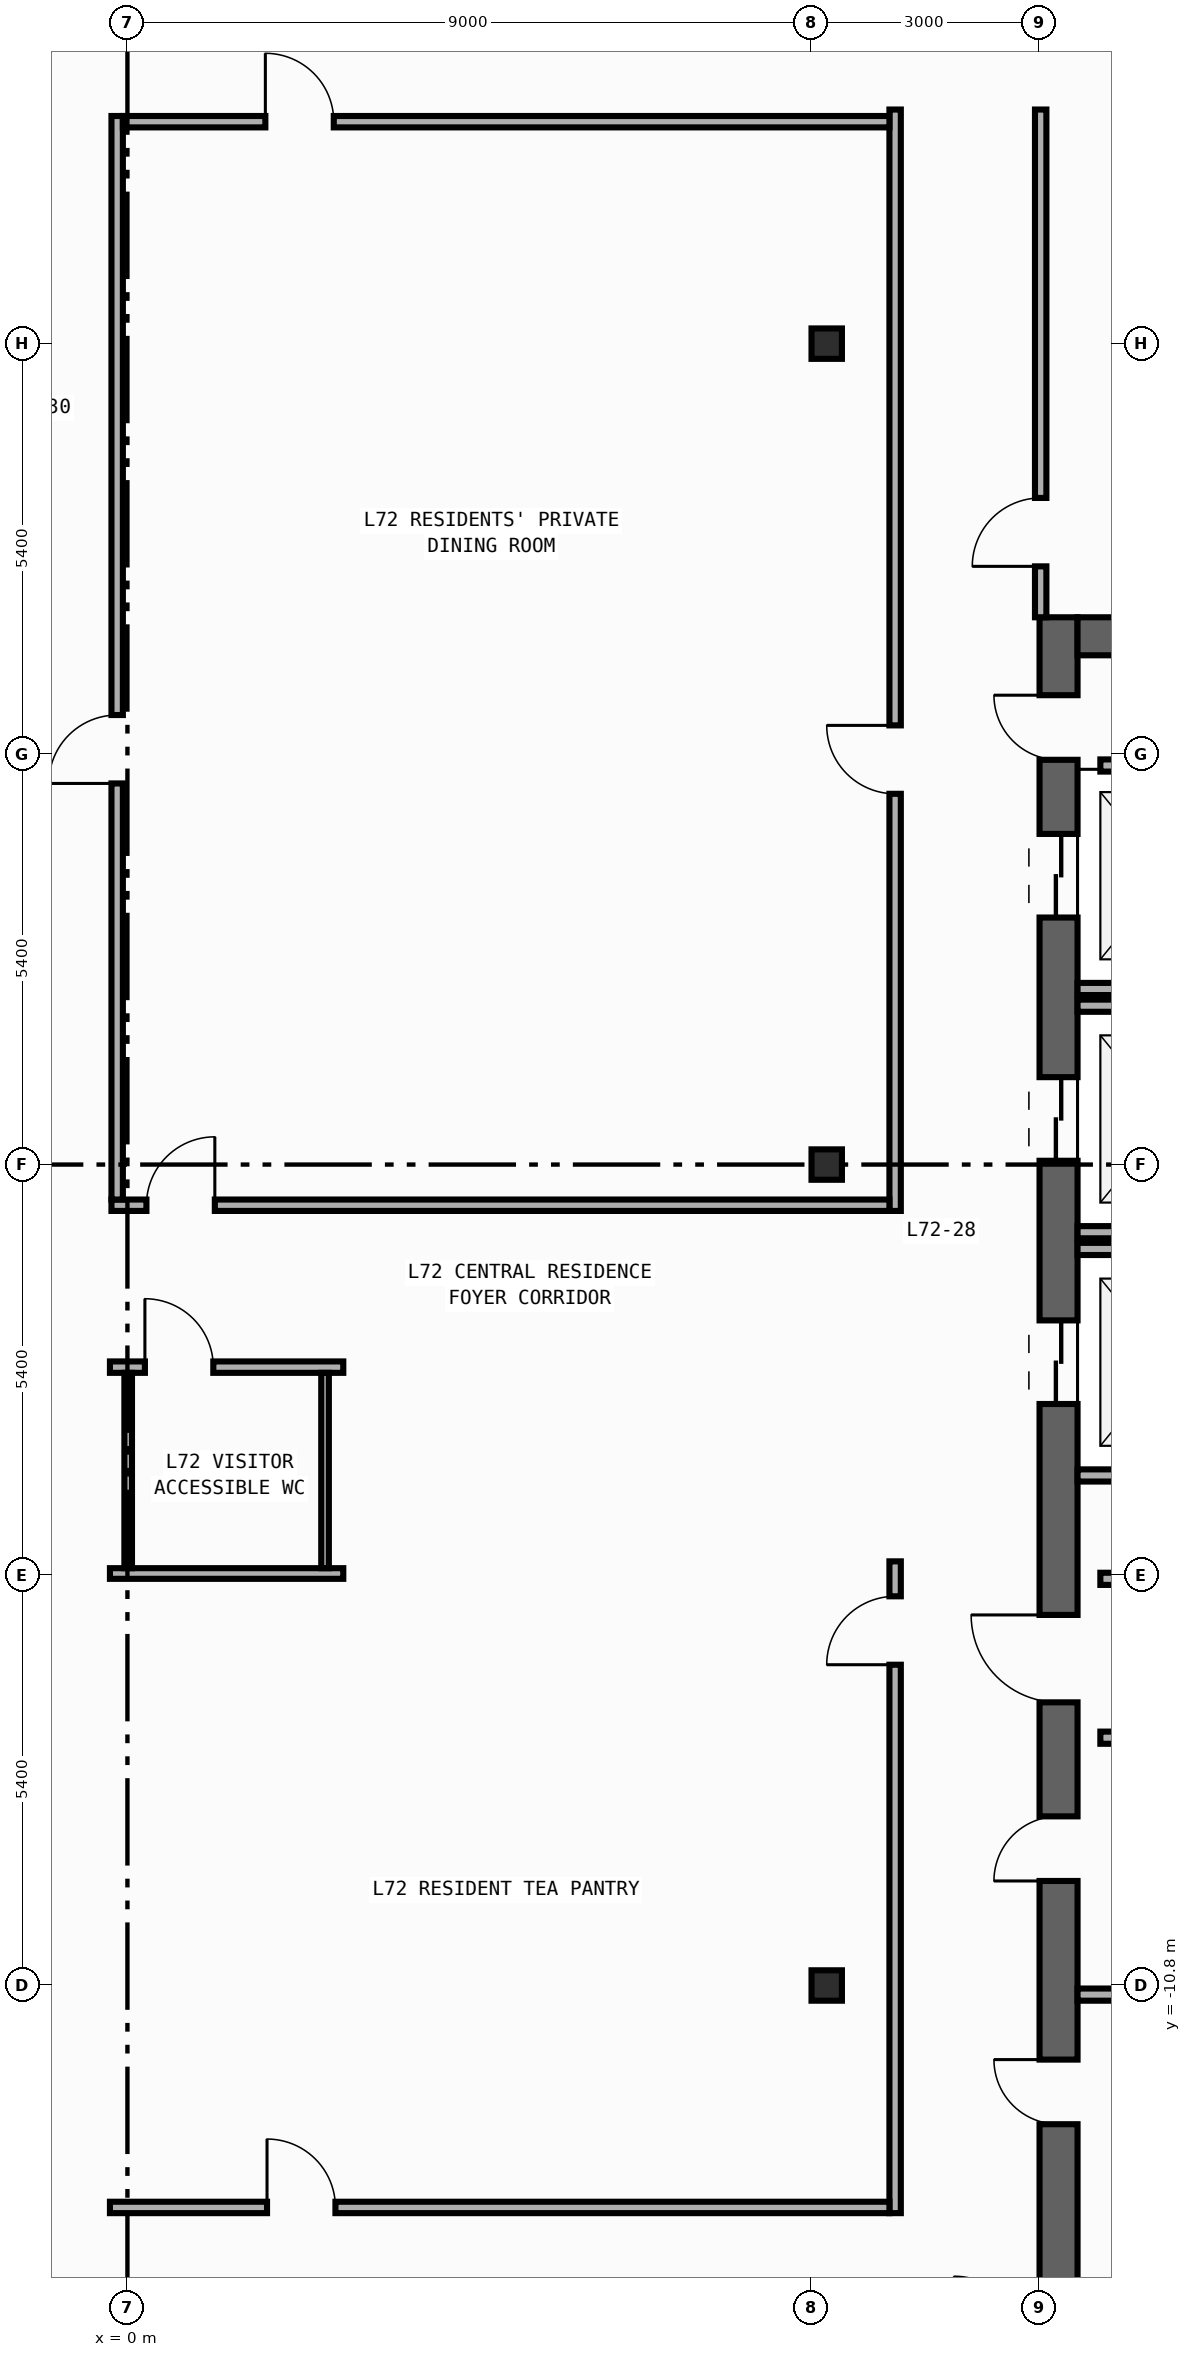
"""IFC4 building model, lengths in metres.
Left out: names, types, materials, properties, quantities, classifications, styles, units other than length and angle.
Written with IfcOpenShell. Run it as: python <this file> out.ifc"""

import sys

from ifc_helpers import new_model, si_unit, direction, frame, frame_2d, origin, origin_2d, place, context, subcontext, project, spatial, rectangle, i_section, extrude, element, fill, save


model = new_model("IFC4")
c1 = context("Model", 3, precision=1e-05, world=origin(), true_north=direction((0.0, 1.0)))
c2 = subcontext(c1, "Body", "Model", "MODEL_VIEW")
j1 = project(units=[si_unit("LENGTHUNIT", "METRE"), si_unit("PLANEANGLEUNIT", "RADIAN")], contexts=[c1])
p1 = place(None, origin())
s1 = spatial("IfcSite", under=j1, at=p1, CompositionType="ELEMENT")
p2 = place(p1, origin())
s2 = spatial("IfcBuilding", under=s1, at=p2, CompositionType="ELEMENT")
p3 = place(p2, frame((0.0, 0.0, 300.4)))
s3 = spatial("IfcBuildingStorey", under=s2, at=p3, CompositionType="ELEMENT", Elevation=300.4)
p4 = place(p3, frame((12.25, -19.8, 0.0), z_axis=(0.0, 0.0, 1.0), x_axis=(0.0, 1.0, 0.0)))
e1 = element("IfcWall", 1, at=p4, inside=s3, PredefinedType="SHEAR", context=c2, shape_type="SweptSolid", body=[
    extrude(rectangle(XDim=27.0, YDim=0.5, at=frame_2d((13.5, 0.0))), origin(), (0.0, 0.0, 1.0), 3.54),
])
p5 = place(p4, frame((23.05, 0.0, 0.0)))
e2 = element("IfcOpeningElement", 2, at=p5, cuts=e1, PredefinedType="OPENING", context=c2, shape_type="SweptSolid", body=[
    extrude(rectangle(XDim=1.1, YDim=2.2, at=frame_2d((0.55, 1.1))), frame((0.0, 0.26, 0.0), z_axis=(0.0, -1.0, 0.0), x_axis=(1.0, 0.0, 0.0)), (0.0, 0.0, 1.0), 0.52),
])
p6 = place(p4, frame((19.85, 0.0, 0.0)))
e3 = element("IfcOpeningElement", 3, at=p6, cuts=e1, PredefinedType="OPENING", context=c2, shape_type="SweptSolid", body=[
    extrude(rectangle(XDim=1.1, YDim=2.2, at=frame_2d((0.55, 1.1))), frame((0.0, 0.26, 0.0), z_axis=(0.0, -1.0, 0.0), x_axis=(1.0, 0.0, 0.0)), (0.0, 0.0, 1.0), 0.52),
])
p7 = place(p4, frame((16.65, 0.0, 0.0)))
e4 = element("IfcOpeningElement", 4, at=p7, cuts=e1, PredefinedType="OPENING", context=c2, shape_type="SweptSolid", body=[
    extrude(rectangle(XDim=1.1, YDim=2.2, at=frame_2d((0.55, 1.1))), frame((0.0, 0.26, 0.0), z_axis=(0.0, -1.0, 0.0), x_axis=(1.0, 0.0, 0.0)), (0.0, 0.0, 1.0), 0.52),
])
p8 = place(p4, frame((7.175, 0.0, 0.0)))
e5 = element("IfcOpeningElement", 5, at=p8, cuts=e1, PredefinedType="OPENING", context=c2, shape_type="SweptSolid", body=[
    extrude(rectangle(XDim=0.85, YDim=2.1, at=frame_2d((0.425, 1.05))), frame((0.0, 0.26, 0.0), z_axis=(0.0, -1.0, 0.0), x_axis=(1.0, 0.0, 0.0)), (0.0, 0.0, 1.0), 0.52),
])
p9 = place(p4, frame((10.375, 0.0, 0.0)))
e6 = element("IfcOpeningElement", 6, at=p9, cuts=e1, PredefinedType="OPENING", context=c2, shape_type="SweptSolid", body=[
    extrude(rectangle(XDim=0.85, YDim=2.1, at=frame_2d((0.425, 1.05))), frame((0.0, 0.26, 0.0), z_axis=(0.0, -1.0, 0.0), x_axis=(1.0, 0.0, 0.0)), (0.0, 0.0, 1.0), 0.52),
])
p10 = place(p4, frame((12.725, 0.0, 0.0)))
e7 = element("IfcOpeningElement", 7, at=p10, cuts=e1, PredefinedType="OPENING", context=c2, shape_type="SweptSolid", body=[
    extrude(rectangle(XDim=1.15, YDim=2.2, at=frame_2d((0.575, 1.1))), frame((0.0, 0.26, 0.0), z_axis=(0.0, -1.0, 0.0), x_axis=(1.0, 0.0, 0.0)), (0.0, 0.0, 1.0), 0.52),
])
p11 = place(p4, frame((25.125, 0.0, 0.0)))
e8 = element("IfcOpeningElement", 8, at=p11, cuts=e1, PredefinedType="OPENING", context=c2, shape_type="SweptSolid", body=[
    extrude(rectangle(XDim=0.85, YDim=2.1, at=frame_2d((0.425, 1.05))), frame((0.0, 0.26, 0.0), z_axis=(0.0, -1.0, 0.0), x_axis=(1.0, 0.0, 0.0)), (0.0, 0.0, 1.0), 0.52),
])
p12 = place(p3, frame((12.5, 6.95, 0.0), z_axis=(0.0, 0.0, 1.0), x_axis=(1.0, 0.0, 0.0)))
e9 = element("IfcWall", 9, at=p12, inside=s3, PredefinedType="SHEAR", context=c2, shape_type="SweptSolid", body=[
    extrude(rectangle(XDim=7.4, YDim=0.5, at=frame_2d((3.7, 0.0))), origin(), (0.0, 0.0, 1.0), 3.54),
])
for number, where, z_axis, x_axis in (
    (10, (9.2, -10.8, 0.0), (0.0, 0.0, 1.0), (1.0, 0.0, 0.0)),
    (11, (9.2, 0.0, 0.0), (0.0, 0.0, 1.0), (1.0, 0.0, 0.0)),
    (12, (9.2, 10.8, 0.0), (0.0, 0.0, 1.0), (1.0, 0.0, 0.0)),
):
    element("IfcColumn", number, at=place(p3, frame(where, z_axis=z_axis, x_axis=x_axis)), inside=s3, PredefinedType="COLUMN", context=c2, shape_type="SweptSolid", body=[
        extrude(i_section(OverallWidth=0.4, OverallDepth=0.4, WebThickness=0.013, FlangeThickness=0.021, FilletRadius=0.022, at=origin_2d()), origin(), (0.0, 0.0, 1.0), 3.8),
    ])
for number, where, z_axis, x_axis in (
    (13, (12.5, 2.31, 0.0), (0.0, 0.0, 1.0), (1.0, 0.0, 0.0)),
    (14, (12.5, -0.89, 0.0), (0.0, 0.0, 1.0), (1.0, 0.0, 0.0)),
    (15, (12.5, 2.09, 0.0), (0.0, 0.0, 1.0), (1.0, 0.0, 0.0)),
    (16, (12.5, -4.09, 0.0), (0.0, 0.0, 1.0), (1.0, 0.0, 0.0)),
    (17, (12.5, -1.11, 0.0), (0.0, 0.0, 1.0), (1.0, 0.0, 0.0)),
):
    element("IfcWall", number, at=place(p3, frame(where, z_axis=z_axis, x_axis=x_axis)), inside=s3, PredefinedType="STANDARD", context=c2, shape_type="SweptSolid", body=[
        extrude(rectangle(XDim=2.49, YDim=0.16, at=frame_2d((1.245, 0.0))), origin(), (0.0, 0.0, 1.0), 3.54),
    ])
for number, where, z_axis, x_axis in (
    (18, (12.8, -5.45, 0.0), (0.0, 0.0, 1.0), (1.0, 0.0, 0.0)),
    (19, (12.8, -7.54, 0.0), (0.0, 0.0, 1.0), (1.0, 0.0, 0.0)),
    (20, (12.8, 5.25, 0.0), (0.0, 0.0, 1.0), (1.0, 0.0, 0.0)),
):
    element("IfcWall", number, at=place(p3, frame(where, z_axis=z_axis, x_axis=x_axis)), inside=s3, PredefinedType="STANDARD", context=c2, shape_type="SweptSolid", body=[
        extrude(rectangle(XDim=2.6, YDim=0.16, at=frame_2d((1.3, 0.0))), origin(), (0.0, 0.0, 1.0), 3.54),
    ])
p13 = place(p3, frame((12.5, -10.92, 0.0), z_axis=(0.0, 0.0, 1.0), x_axis=(1.0, 0.0, 0.0)))
e21 = element("IfcWall", 21, at=p13, inside=s3, PredefinedType="PARTITIONING", context=c2, shape_type="SweptSolid", body=[
    extrude(rectangle(XDim=2.9, YDim=0.16, at=frame_2d((1.45, 0.0))), origin(), (0.0, 0.0, 1.0), 2.64),
])
p14 = place(p3, frame((12.015, 7.2, 0.0), z_axis=(0.0, 0.0, 1.0), x_axis=(0.0, 1.0, 0.0)))
e22 = element("IfcWall", 22, at=p14, inside=s3, PredefinedType="PARTITIONING", context=c2, shape_type="SweptSolid", body=[
    extrude(rectangle(XDim=6.68, YDim=0.15, at=frame_2d((3.34, 0.0))), origin(), (0.0, 0.0, 1.0), 3.54),
])
p15 = place(p14, frame((0.67, 0.0, 0.0)))
e23 = element("IfcOpeningElement", 23, at=p15, cuts=e22, PredefinedType="OPENING", context=c2, shape_type="SweptSolid", body=[
    extrude(rectangle(XDim=0.9, YDim=2.15, at=frame_2d((0.45, 1.075))), frame((0.0, 0.085, 0.0), z_axis=(0.0, -1.0, 0.0), x_axis=(1.0, 0.0, 0.0)), (0.0, 0.0, 1.0), 0.17),
])
p16 = place(p3, frame((10.1, -0.61, 0.0), z_axis=(0.0, 0.0, 1.0), x_axis=(0.0, 1.0, 0.0)))
e24 = element("IfcWall", 24, at=p16, inside=s3, PredefinedType="PARTITIONING", context=c2, shape_type="SweptSolid", body=[
    extrude(rectangle(XDim=14.49, YDim=0.15, at=frame_2d((7.245, 0.0))), origin(), (0.0, 0.0, 1.0), 3.54),
])
p17 = place(p16, frame((5.488, 0.0, 0.0)))
e25 = element("IfcOpeningElement", 25, at=p17, cuts=e24, PredefinedType="OPENING", context=c2, shape_type="SweptSolid", body=[
    extrude(rectangle(XDim=0.9, YDim=2.15, at=frame_2d((0.45, 1.075))), frame((0.0, 0.085, 0.0), z_axis=(0.0, -1.0, 0.0), x_axis=(1.0, 0.0, 0.0)), (0.0, 0.0, 1.0), 0.17),
])
p18 = place(p3, frame((10.1, -13.795, 0.0), z_axis=(0.0, 0.0, 1.0), x_axis=(0.0, 1.0, 0.0)))
e26 = element("IfcWall", 26, at=p18, inside=s3, PredefinedType="PARTITIONING", context=c2, shape_type="SweptSolid", body=[
    extrude(rectangle(XDim=8.575, YDim=0.15, at=frame_2d((4.288, 0.0))), origin(), (0.0, 0.0, 1.0), 3.54),
])
p19 = place(p18, frame((7.215, 0.0, 0.0)))
e27 = element("IfcOpeningElement", 27, at=p19, cuts=e26, PredefinedType="OPENING", context=c2, shape_type="SweptSolid", body=[
    extrude(rectangle(XDim=0.9, YDim=2.15, at=frame_2d((0.45, 1.075))), frame((0.0, 0.085, 0.0), z_axis=(0.0, -1.0, 0.0), x_axis=(1.0, 0.0, 0.0)), (0.0, 0.0, 1.0), 0.17),
])
p20 = place(p3, frame((-0.21, -0.535, 0.0), z_axis=(0.0, 0.0, 1.0), x_axis=(1.0, 0.0, 0.0)))
e28 = element("IfcWall", 28, at=p20, inside=s3, PredefinedType="PARTITIONING", context=c2, shape_type="SweptSolid", body=[
    extrude(rectangle(XDim=10.235, YDim=0.15, at=frame_2d((5.117, 0.0))), origin(), (0.0, 0.0, 1.0), 3.54),
])
p21 = place(p20, frame((0.46, 0.0, 0.0)))
e29 = element("IfcOpeningElement", 29, at=p21, cuts=e28, PredefinedType="OPENING", context=c2, shape_type="SweptSolid", body=[
    extrude(rectangle(XDim=0.9, YDim=2.15, at=frame_2d((0.45, 1.075))), frame((0.0, 0.085, 0.0), z_axis=(0.0, -1.0, 0.0), x_axis=(1.0, 0.0, 0.0)), (0.0, 0.0, 1.0), 0.17),
])
p22 = place(p3, frame((-0.23, -2.665, 0.0), z_axis=(0.0, 0.0, 1.0), x_axis=(1.0, 0.0, 0.0)))
e30 = element("IfcWall", 30, at=p22, inside=s3, PredefinedType="PARTITIONING", context=c2, shape_type="SweptSolid", body=[
    extrude(rectangle(XDim=3.07, YDim=0.15, at=frame_2d((1.535, 0.0))), origin(), (0.0, 0.0, 1.0), 3.54),
])
p23 = place(p22, frame((0.46, 0.0, 0.0)))
e31 = element("IfcOpeningElement", 31, at=p23, cuts=e30, PredefinedType="OPENING", context=c2, shape_type="SweptSolid", body=[
    extrude(rectangle(XDim=0.9, YDim=2.15, at=frame_2d((0.45, 1.075))), frame((0.0, 0.085, 0.0), z_axis=(0.0, -1.0, 0.0), x_axis=(1.0, 0.0, 0.0)), (0.0, 0.0, 1.0), 0.17),
])
p24 = place(p3, frame((-0.135, -0.46, 0.0), z_axis=(0.0, 0.0, 1.0), x_axis=(0.0, 1.0, 0.0)))
e32 = element("IfcWall", 32, at=p24, inside=s3, PredefinedType="PARTITIONING", context=c2, shape_type="SweptSolid", body=[
    extrude(rectangle(XDim=14.255, YDim=0.15, at=frame_2d((7.127, 0.0))), origin(), (0.0, 0.0, 1.0), 3.54),
])
p25 = place(p24, frame((5.474, 0.0, 0.0)))
e33 = element("IfcOpeningElement", 33, at=p25, cuts=e32, PredefinedType="OPENING", context=c2, shape_type="SweptSolid", body=[
    extrude(rectangle(XDim=0.9, YDim=2.15, at=frame_2d((0.45, 1.075))), frame((0.0, 0.085, 0.0), z_axis=(0.0, -1.0, 0.0), x_axis=(1.0, 0.0, 0.0)), (0.0, 0.0, 1.0), 0.17),
])
p26 = place(p3, frame((-0.06, 13.72, 0.0), z_axis=(0.0, 0.0, 1.0), x_axis=(1.0, 0.0, 0.0)))
e34 = element("IfcWall", 34, at=p26, inside=s3, PredefinedType="PARTITIONING", context=c2, shape_type="SweptSolid", body=[
    extrude(rectangle(XDim=10.085, YDim=0.15, at=frame_2d((5.042, 0.0))), origin(), (0.0, 0.0, 1.0), 3.54),
])
p27 = place(p26, frame((1.875, 0.0, 0.0)))
e35 = element("IfcOpeningElement", 35, at=p27, cuts=e34, PredefinedType="OPENING", context=c2, shape_type="SweptSolid", body=[
    extrude(rectangle(XDim=0.9, YDim=2.15, at=frame_2d((0.45, 1.075))), frame((0.0, 0.085, 0.0), z_axis=(0.0, -1.0, 0.0), x_axis=(1.0, 0.0, 0.0)), (0.0, 0.0, 1.0), 0.17),
])
p28 = place(p3, frame((-0.23, -13.72, 0.0), z_axis=(0.0, 0.0, 1.0), x_axis=(1.0, 0.0, 0.0)))
e36 = element("IfcWall", 36, at=p28, inside=s3, PredefinedType="PARTITIONING", context=c2, shape_type="SweptSolid", body=[
    extrude(rectangle(XDim=10.255, YDim=0.15, at=frame_2d((5.127, 0.0))), origin(), (0.0, 0.0, 1.0), 3.54),
])
p29 = place(p28, frame((2.067, 0.0, 0.0)))
e37 = element("IfcOpeningElement", 37, at=p29, cuts=e36, PredefinedType="OPENING", context=c2, shape_type="SweptSolid", body=[
    extrude(rectangle(XDim=0.9, YDim=2.15, at=frame_2d((0.45, 1.075))), frame((0.0, 0.085, 0.0), z_axis=(0.0, -1.0, 0.0), x_axis=(1.0, 0.0, 0.0)), (0.0, 0.0, 1.0), 0.17),
])
p30 = place(p3, frame((-0.23, -5.38, 0.0), z_axis=(0.0, 0.0, 1.0), x_axis=(1.0, 0.0, 0.0)))
e38 = element("IfcWall", 38, at=p30, inside=s3, PredefinedType="PARTITIONING", context=c2, shape_type="SweptSolid", body=[
    extrude(rectangle(XDim=3.07, YDim=0.14, at=frame_2d((1.535, 0.0))), origin(), (0.0, 0.0, 1.0), 3.54),
])
for number, where, z_axis, x_axis in (
    (39, (2.6, -2.74, 0.0), (0.0, 0.0, 1.0), (0.0, -1.0, 0.0)),
    (40, (0.01, -5.31, 0.0), (0.0, 0.0, 1.0), (0.0, 1.0, 0.0)),
):
    element("IfcWall", number, at=place(p3, frame(where, z_axis=z_axis, x_axis=x_axis)), inside=s3, PredefinedType="PARTITIONING", context=c2, shape_type="SweptSolid", body=[
        extrude(rectangle(XDim=2.57, YDim=0.1, at=frame_2d((1.285, 0.0))), origin(), (0.0, 0.0, 1.0), 3.54),
    ])
p31 = place(p5, origin())
e41 = element("IfcDoor", 41, at=p31, inside=s3, OperationType="DOUBLE_DOOR_SLIDING", PredefinedType="DOOR", context=c2, shape_type="SweptSolid", body=[
    extrude(rectangle(XDim=1.1, YDim=2.2, at=frame_2d((0.55, 1.1))), frame((0.0, 0.025, 0.0), z_axis=(0.0, -1.0, 0.0), x_axis=(1.0, 0.0, 0.0)), (0.0, 0.0, 1.0), 0.05),
])
fill(e2, e41)
p32 = place(p6, origin())
e42 = element("IfcDoor", 42, at=p32, inside=s3, OperationType="DOUBLE_DOOR_SLIDING", PredefinedType="DOOR", context=c2, shape_type="SweptSolid", body=[
    extrude(rectangle(XDim=1.1, YDim=2.2, at=frame_2d((0.55, 1.1))), frame((0.0, 0.025, 0.0), z_axis=(0.0, -1.0, 0.0), x_axis=(1.0, 0.0, 0.0)), (0.0, 0.0, 1.0), 0.05),
])
fill(e3, e42)
p33 = place(p7, origin())
e43 = element("IfcDoor", 43, at=p33, inside=s3, OperationType="DOUBLE_DOOR_SLIDING", PredefinedType="DOOR", context=c2, shape_type="SweptSolid", body=[
    extrude(rectangle(XDim=1.1, YDim=2.2, at=frame_2d((0.55, 1.1))), frame((0.0, 0.025, 0.0), z_axis=(0.0, -1.0, 0.0), x_axis=(1.0, 0.0, 0.0)), (0.0, 0.0, 1.0), 0.05),
])
fill(e4, e43)
p34 = place(p8, origin())
e44 = element("IfcDoor", 44, at=p34, inside=s3, OperationType="SINGLE_SWING_RIGHT", PredefinedType="DOOR", context=c2, shape_type="SweptSolid", body=[
    extrude(rectangle(XDim=0.85, YDim=2.1, at=frame_2d((0.425, 1.05))), frame((0.0, 0.025, 0.0), z_axis=(0.0, -1.0, 0.0), x_axis=(1.0, 0.0, 0.0)), (0.0, 0.0, 1.0), 0.05),
])
fill(e5, e44)
p35 = place(p9, origin())
e45 = element("IfcDoor", 45, at=p35, inside=s3, OperationType="SINGLE_SWING_LEFT", PredefinedType="DOOR", context=c2, shape_type="SweptSolid", body=[
    extrude(rectangle(XDim=0.85, YDim=2.1, at=frame_2d((0.425, 1.05))), frame((0.0, 0.025, 0.0), z_axis=(0.0, -1.0, 0.0), x_axis=(1.0, 0.0, 0.0)), (0.0, 0.0, 1.0), 0.05),
])
fill(e6, e45)
p36 = place(p10, origin())
e46 = element("IfcDoor", 46, at=p36, inside=s3, OperationType="SINGLE_SWING_RIGHT", PredefinedType="DOOR", context=c2, shape_type="SweptSolid", body=[
    extrude(rectangle(XDim=1.15, YDim=2.2, at=frame_2d((0.575, 1.1))), frame((0.0, 0.025, 0.0), z_axis=(0.0, -1.0, 0.0), x_axis=(1.0, 0.0, 0.0)), (0.0, 0.0, 1.0), 0.05),
])
fill(e7, e46)
p37 = place(p11, origin())
e47 = element("IfcDoor", 47, at=p37, inside=s3, OperationType="SINGLE_SWING_RIGHT", PredefinedType="DOOR", context=c2, shape_type="SweptSolid", body=[
    extrude(rectangle(XDim=0.85, YDim=2.1, at=frame_2d((0.425, 1.05))), frame((0.0, 0.025, 0.0), z_axis=(0.0, -1.0, 0.0), x_axis=(1.0, 0.0, 0.0)), (0.0, 0.0, 1.0), 0.05),
])
fill(e8, e47)
p38 = place(p15, origin())
e48 = element("IfcDoor", 48, at=p38, inside=s3, OperationType="SINGLE_SWING_LEFT", PredefinedType="DOOR", context=c2, shape_type="SweptSolid", body=[
    extrude(rectangle(XDim=0.9, YDim=2.15, at=frame_2d((0.45, 1.075))), frame((0.0, 0.025, 0.0), z_axis=(0.0, -1.0, 0.0), x_axis=(1.0, 0.0, 0.0)), (0.0, 0.0, 1.0), 0.05),
])
fill(e23, e48)
p39 = place(p17, origin())
e49 = element("IfcDoor", 49, at=p39, inside=s3, OperationType="SINGLE_SWING_RIGHT", PredefinedType="DOOR", context=c2, shape_type="SweptSolid", body=[
    extrude(rectangle(XDim=0.9, YDim=2.15, at=frame_2d((0.45, 1.075))), frame((0.0, 0.025, 0.0), z_axis=(0.0, -1.0, 0.0), x_axis=(1.0, 0.0, 0.0)), (0.0, 0.0, 1.0), 0.05),
])
fill(e25, e49)
p40 = place(p19, origin())
e50 = element("IfcDoor", 50, at=p40, inside=s3, OperationType="SINGLE_SWING_LEFT", PredefinedType="DOOR", context=c2, shape_type="SweptSolid", body=[
    extrude(rectangle(XDim=0.9, YDim=2.15, at=frame_2d((0.45, 1.075))), frame((0.0, 0.025, 0.0), z_axis=(0.0, -1.0, 0.0), x_axis=(1.0, 0.0, 0.0)), (0.0, 0.0, 1.0), 0.05),
])
fill(e27, e50)
p41 = place(p21, origin())
e51 = element("IfcDoor", 51, at=p41, inside=s3, OperationType="SINGLE_SWING_RIGHT", PredefinedType="DOOR", context=c2, shape_type="SweptSolid", body=[
    extrude(rectangle(XDim=0.9, YDim=2.15, at=frame_2d((0.45, 1.075))), frame((0.0, 0.025, 0.0), z_axis=(0.0, -1.0, 0.0), x_axis=(1.0, 0.0, 0.0)), (0.0, 0.0, 1.0), 0.05),
])
fill(e29, e51)
p42 = place(p23, origin())
e52 = element("IfcDoor", 52, at=p42, inside=s3, OperationType="SINGLE_SWING_LEFT", PredefinedType="DOOR", context=c2, shape_type="SweptSolid", body=[
    extrude(rectangle(XDim=0.9, YDim=2.15, at=frame_2d((0.45, 1.075))), frame((0.0, 0.025, 0.0), z_axis=(0.0, -1.0, 0.0), x_axis=(1.0, 0.0, 0.0)), (0.0, 0.0, 1.0), 0.05),
])
fill(e31, e52)
p43 = place(p25, origin())
e53 = element("IfcDoor", 53, at=p43, inside=s3, OperationType="SINGLE_SWING_LEFT", PredefinedType="DOOR", context=c2, shape_type="SweptSolid", body=[
    extrude(rectangle(XDim=0.9, YDim=2.15, at=frame_2d((0.45, 1.075))), frame((0.0, 0.025, 0.0), z_axis=(0.0, -1.0, 0.0), x_axis=(1.0, 0.0, 0.0)), (0.0, 0.0, 1.0), 0.05),
])
fill(e33, e53)
p44 = place(p27, origin())
e54 = element("IfcDoor", 54, at=p44, inside=s3, OperationType="SINGLE_SWING_LEFT", PredefinedType="DOOR", context=c2, shape_type="SweptSolid", body=[
    extrude(rectangle(XDim=0.9, YDim=2.15, at=frame_2d((0.45, 1.075))), frame((0.0, 0.025, 0.0), z_axis=(0.0, -1.0, 0.0), x_axis=(1.0, 0.0, 0.0)), (0.0, 0.0, 1.0), 0.05),
])
fill(e35, e54)
p45 = place(p29, origin())
e55 = element("IfcDoor", 55, at=p45, inside=s3, OperationType="SINGLE_SWING_LEFT", PredefinedType="DOOR", context=c2, shape_type="SweptSolid", body=[
    extrude(rectangle(XDim=0.9, YDim=2.15, at=frame_2d((0.45, 1.075))), frame((0.0, 0.025, 0.0), z_axis=(0.0, -1.0, 0.0), x_axis=(1.0, 0.0, 0.0)), (0.0, 0.0, 1.0), 0.05),
])
fill(e37, e55)
save(model, sys.argv[1])
